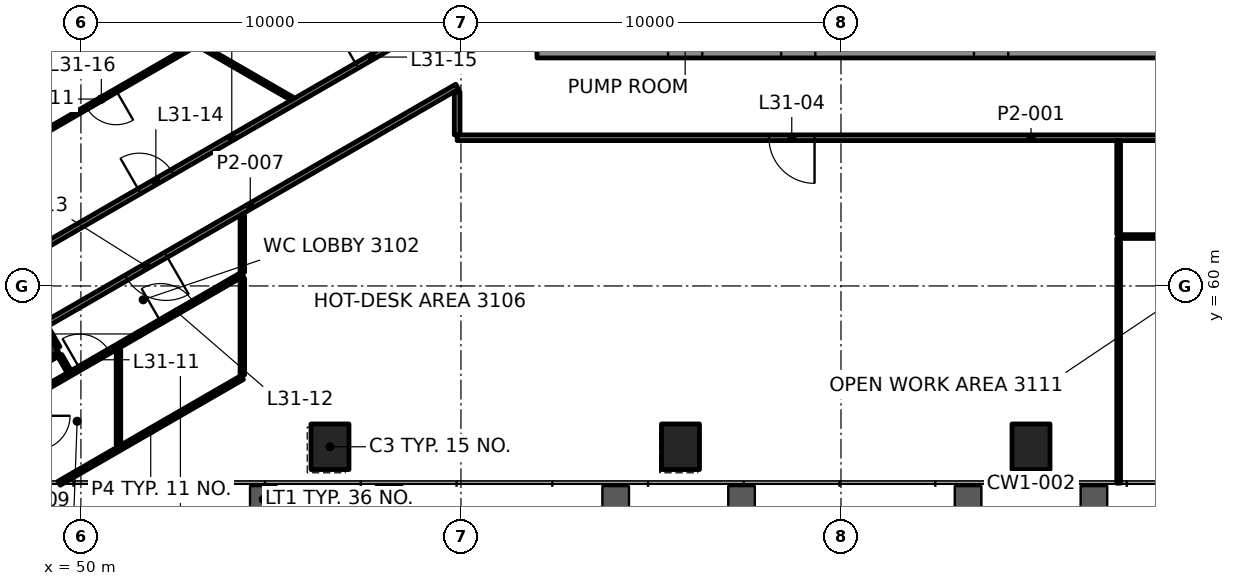
"""IFC4 building model, lengths in metres.
Left out: names, types, materials, properties, quantities, classifications, styles, units other than length and angle.
Written with IfcOpenShell. Run it as: python <this file> out.ifc"""

import sys

from ifc_helpers import new_model, si_unit, direction, frame, frame_2d, origin, origin_2d, place, context, subcontext, project, spatial, rectangle, extrude, element, fill, save


model = new_model("IFC4")
c1 = context("Model", 3, precision=1e-05, world=origin(), true_north=direction((0.0, 1.0)))
c2 = subcontext(c1, "Body", "Model", "MODEL_VIEW")
j1 = project(units=[si_unit("LENGTHUNIT", "METRE"), si_unit("PLANEANGLEUNIT", "RADIAN")], contexts=[c1])
p1 = place(None, origin())
s1 = spatial("IfcSite", under=j1, at=p1, CompositionType="ELEMENT")
p2 = place(p1, origin())
s2 = spatial("IfcBuilding", under=s1, at=p2, CompositionType="ELEMENT")
p3 = place(p2, frame((0.0, 0.0, 136.6)))
s3 = spatial("IfcBuildingStorey", under=s2, at=p3, CompositionType="ELEMENT", Elevation=136.6)
p4 = place(p3, frame((47.089, 58.886, 0.0), z_axis=(0.0, 0.0, 1.0), x_axis=(0.5, -0.866025403784, 0.0)))
e1 = element("IfcColumn", 1, at=p4, inside=s3, PredefinedType="COLUMN", context=c2, shape_type="SweptSolid", body=[
    extrude(rectangle(XDim=3.4, YDim=3.4, at=origin_2d()), origin(), (0.0, 0.0, 1.0), 4.2),
])
for number, where, z_axis, x_axis in (
    (2, (56.554, 55.768, -0.0), (0.0, 0.0, 1.0), (1.0, 0.0, 0.0)),
    (3, (65.777, 55.768, -0.0), (0.0, 0.0, 1.0), (1.0, 0.0, 0.0)),
    (4, (75.0, 55.768, -0.0), (0.0, 0.0, 1.0), (1.0, 0.0, 0.0)),
):
    element("IfcColumn", number, at=place(p3, frame(where, z_axis=z_axis, x_axis=x_axis)), inside=s3, PredefinedType="COLUMN", context=c2, shape_type="SweptSolid", body=[
        extrude(rectangle(XDim=1.0, YDim=1.2, at=origin_2d()), origin(), (0.0, 0.0, 1.0), 4.2),
    ])
p5 = place(p3, frame((62.0, 66.45, 0.0), z_axis=(0.0, 0.0, 1.0), x_axis=(1.0, 0.0, 0.0)))
e5 = element("IfcWall", 5, at=p5, inside=s3, PredefinedType="SHEAR", context=c2, shape_type="SweptSolid", body=[
    extrude(rectangle(XDim=26.0, YDim=0.9, at=frame_2d((13.0, 0.0))), origin(), (0.0, 0.0, 1.0), 3.9),
])
p6 = place(p5, frame((3.45, 0.0, 0.0)))
e6 = element("IfcOpeningElement", 6, at=p6, cuts=e5, PredefinedType="OPENING", context=c2, shape_type="SweptSolid", body=[
    extrude(rectangle(XDim=0.9, YDim=2.1, at=frame_2d((0.45, 1.05))), frame((0.0, 0.46, 0.0), z_axis=(0.0, -1.0, 0.0), x_axis=(1.0, 0.0, 0.0)), (0.0, 0.0, 1.0), 0.92),
])
p7 = place(p5, frame((6.425, 0.0, 0.0)))
e7 = element("IfcOpeningElement", 7, at=p7, cuts=e5, PredefinedType="OPENING", context=c2, shape_type="SweptSolid", body=[
    extrude(rectangle(XDim=0.9, YDim=2.1, at=frame_2d((0.45, 1.05))), frame((0.0, 0.46, 0.0), z_axis=(0.0, -1.0, 0.0), x_axis=(1.0, 0.0, 0.0)), (0.0, 0.0, 1.0), 0.92),
])
p8 = place(p5, frame((11.5, 0.0, 0.0)))
e8 = element("IfcOpeningElement", 8, at=p8, cuts=e5, PredefinedType="OPENING", context=c2, shape_type="SweptSolid", body=[
    extrude(rectangle(XDim=0.9, YDim=2.1, at=frame_2d((0.45, 1.05))), frame((0.0, 0.46, 0.0), z_axis=(0.0, -1.0, 0.0), x_axis=(1.0, 0.0, 0.0)), (0.0, 0.0, 1.0), 0.92),
])
p9 = place(p5, frame((18.5, 0.0, 0.0)))
e9 = element("IfcOpeningElement", 9, at=p9, cuts=e5, PredefinedType="OPENING", context=c2, shape_type="SweptSolid", body=[
    extrude(rectangle(XDim=0.9, YDim=2.1, at=frame_2d((0.45, 1.05))), frame((0.0, 0.46, 0.0), z_axis=(0.0, -1.0, 0.0), x_axis=(1.0, 0.0, 0.0)), (0.0, 0.0, 1.0), 0.92),
])
p10 = place(p5, frame((23.325, 0.0, 0.0)))
e10 = element("IfcOpeningElement", 10, at=p10, cuts=e5, PredefinedType="OPENING", context=c2, shape_type="SweptSolid", body=[
    extrude(rectangle(XDim=0.9, YDim=2.1, at=frame_2d((0.45, 1.05))), frame((0.0, 0.46, 0.0), z_axis=(0.0, -1.0, 0.0), x_axis=(1.0, 0.0, 0.0)), (0.0, 0.0, 1.0), 0.92),
])
p11 = place(p3, frame((77.306, 61.3, 0.0), z_axis=(0.0, 0.0, 1.0), x_axis=(1.0, 0.0, 0.0)))
e11 = element("IfcWall", 11, at=p11, inside=s3, PredefinedType="PARTITIONING", context=c2, shape_type="SweptSolid", body=[
    extrude(rectangle(XDim=14.423, YDim=0.1, at=frame_2d((7.211, 0.0))), origin(), (0.0, 0.0, 1.0), 3.3),
])
p12 = place(p11, frame((3.687, 0.0, 0.0)))
e12 = element("IfcOpeningElement", 12, at=p12, cuts=e11, PredefinedType="OPENING", context=c2, shape_type="SweptSolid", body=[
    extrude(rectangle(XDim=0.9, YDim=2.1, at=frame_2d((0.45, 1.05))), frame((0.0, 0.06, 0.0), z_axis=(0.0, -1.0, 0.0), x_axis=(1.0, 0.0, 0.0)), (0.0, 0.0, 1.0), 0.12),
])
p13 = place(p11, frame((10.695, 0.0, 0.0)))
e13 = element("IfcOpeningElement", 13, at=p13, cuts=e11, PredefinedType="OPENING", context=c2, shape_type="SweptSolid", body=[
    extrude(rectangle(XDim=0.9, YDim=2.1, at=frame_2d((0.45, 1.05))), frame((0.0, 0.06, 0.0), z_axis=(0.0, -1.0, 0.0), x_axis=(1.0, 0.0, 0.0)), (0.0, 0.0, 1.0), 0.12),
])
p14 = place(p3, frame((90.1, 63.9, 0.0), z_axis=(0.0, 0.0, 1.0), x_axis=(-1.0, 0.0, 0.0)))
e14 = element("IfcWall", 14, at=p14, inside=s3, PredefinedType="PARTITIONING", context=c2, shape_type="SweptSolid", body=[
    extrude(rectangle(XDim=30.199, YDim=0.15, at=frame_2d((15.1, 0.0))), origin(), (0.0, 0.0, 1.0), 3.3),
])
p15 = place(p14, frame((5.999, 0.0, 0.0)))
e15 = element("IfcOpeningElement", 15, at=p15, cuts=e14, PredefinedType="OPENING", context=c2, shape_type="SweptSolid", body=[
    extrude(rectangle(XDim=1.0, YDim=2.1, at=frame_2d((0.5, 1.05))), frame((0.0, 0.085, 0.0), z_axis=(0.0, -1.0, 0.0), x_axis=(1.0, 0.0, 0.0)), (0.0, 0.0, 1.0), 0.17),
])
p16 = place(p14, frame((20.795, 0.0, 0.0)))
e16 = element("IfcOpeningElement", 16, at=p16, cuts=e14, PredefinedType="OPENING", context=c2, shape_type="SweptSolid", body=[
    extrude(rectangle(XDim=1.2, YDim=2.1, at=frame_2d((0.6, 1.05))), frame((0.0, 0.085, 0.0), z_axis=(0.0, -1.0, 0.0), x_axis=(1.0, 0.0, 0.0)), (0.0, 0.0, 1.0), 0.17),
])
p17 = place(p3, frame((49.427, 54.808, 0.0), z_axis=(0.0, 0.0, 1.0), x_axis=(0.866021245731, 0.500007201891, 0.0)))
e17 = element("IfcWall", 17, at=p17, inside=s3, PredefinedType="PARTITIONING", context=c2, shape_type="SweptSolid", body=[
    extrude(rectangle(XDim=5.566, YDim=0.12, at=frame_2d((2.783, 0.0))), origin(), (0.0, 0.0, 1.0), 3.3),
])
p18 = place(p3, frame((48.814, 57.168, 0.0), z_axis=(0.0, 0.0, 1.0), x_axis=(0.866009986161, 0.500026703156, 0.0)))
e18 = element("IfcWall", 18, at=p18, inside=s3, PredefinedType="PARTITIONING", context=c2, shape_type="SweptSolid", body=[
    extrude(rectangle(XDim=6.275, YDim=0.12, at=frame_2d((3.137, 0.0))), origin(), (0.0, 0.0, 1.0), 3.3),
])
p19 = place(p18, frame((1.329, 0.0, 0.0)))
e19 = element("IfcOpeningElement", 19, at=p19, cuts=e18, PredefinedType="OPENING", context=c2, shape_type="SweptSolid", body=[
    extrude(rectangle(XDim=0.9, YDim=2.1, at=frame_2d((0.45, 1.05))), frame((0.0, 0.07, 0.0), z_axis=(0.0, -1.0, 0.0), x_axis=(1.0, 0.0, 0.0)), (0.0, 0.0, 1.0), 0.14),
])
p20 = place(p18, frame((3.791, 0.0, 0.0)))
e20 = element("IfcOpeningElement", 20, at=p20, cuts=e18, PredefinedType="OPENING", context=c2, shape_type="SweptSolid", body=[
    extrude(rectangle(XDim=1.0, YDim=2.1, at=frame_2d((0.5, 1.05))), frame((0.0, 0.07, 0.0), z_axis=(0.0, -1.0, 0.0), x_axis=(1.0, 0.0, 0.0)), (0.0, 0.0, 1.0), 0.14),
])
p21 = place(p3, frame((46.329, 56.484, 0.0), z_axis=(0.0, 0.0, 1.0), x_axis=(0.866034141321, 0.499984865837, 0.0)))
e21 = element("IfcWall", 21, at=p21, inside=s3, PredefinedType="PARTITIONING", context=c2, shape_type="SweptSolid", body=[
    extrude(rectangle(XDim=3.543, YDim=0.2, at=frame_2d((1.772, 0.0))), origin(), (0.0, 0.0, 1.0), 3.3),
])
p22 = place(p3, frame((59.9, 65.243, 0.0), z_axis=(0.0, 0.0, 1.0), x_axis=(-0.866021305353, -0.500007098624, 0.0)))
e22 = element("IfcWall", 22, at=p22, inside=s3, PredefinedType="PARTITIONING", context=c2, shape_type="SweptSolid", body=[
    extrude(rectangle(XDim=12.572, YDim=0.15, at=frame_2d((6.286, 0.0))), origin(), (0.0, 0.0, 1.0), 3.147),
])
p23 = place(p22, frame((8.848, 0.0, 0.0)))
e23 = element("IfcOpeningElement", 23, at=p23, cuts=e22, PredefinedType="OPENING", context=c2, shape_type="SweptSolid", body=[
    extrude(rectangle(XDim=1.2, YDim=2.1, at=frame_2d((0.6, 1.05))), frame((0.0, 0.085, 0.0), z_axis=(0.0, -1.0, 0.0), x_axis=(1.0, 0.0, 0.0)), (0.0, 0.0, 1.0), 0.17),
])
p24 = place(p3, frame((48.114, 60.517, 0.0), z_axis=(0.0, 0.0, 1.0), x_axis=(0.866023530324, 0.500003244914, 0.0)))
e24 = element("IfcWall", 24, at=p24, inside=s3, PredefinedType="PARTITIONING", context=c2, shape_type="SweptSolid", body=[
    extrude(rectangle(XDim=13.522, YDim=0.15, at=frame_2d((6.761, 0.0))), origin(), (0.0, 0.0, 1.0), 3.3),
])
p25 = place(p24, frame((3.954, 0.0, 0.0)))
e25 = element("IfcOpeningElement", 25, at=p25, cuts=e24, PredefinedType="OPENING", context=c2, shape_type="SweptSolid", body=[
    extrude(rectangle(XDim=1.0, YDim=2.1, at=frame_2d((0.5, 1.05))), frame((0.0, 0.085, 0.0), z_axis=(0.0, -1.0, 0.0), x_axis=(1.0, 0.0, 0.0)), (0.0, 0.0, 1.0), 0.17),
])
p26 = place(p24, frame((10.562, 0.0, 0.0)))
e26 = element("IfcOpeningElement", 26, at=p26, cuts=e24, PredefinedType="OPENING", context=c2, shape_type="SweptSolid", body=[
    extrude(rectangle(XDim=0.9, YDim=2.1, at=frame_2d((0.45, 1.05))), frame((0.0, 0.085, 0.0), z_axis=(0.0, -1.0, 0.0), x_axis=(1.0, 0.0, 0.0)), (0.0, 0.0, 1.0), 0.17),
])
p27 = place(p3, frame((52.978, 66.327, 0.0), z_axis=(0.0, 0.0, 1.0), x_axis=(-0.86603265506, -0.499987440211, 0.0)))
e27 = element("IfcWall", 27, at=p27, inside=s3, PredefinedType="PARTITIONING", context=c2, shape_type="SweptSolid", body=[
    extrude(rectangle(XDim=5.636, YDim=0.1, at=frame_2d((2.818, 0.0))), origin(), (0.0, 0.0, 1.0), 3.3),
])
p28 = place(p27, frame((2.368, 0.0, 0.0)))
e28 = element("IfcOpeningElement", 28, at=p28, cuts=e27, PredefinedType="OPENING", context=c2, shape_type="SweptSolid", body=[
    extrude(rectangle(XDim=0.9, YDim=2.1, at=frame_2d((0.45, 1.05))), frame((0.0, 0.06, 0.0), z_axis=(0.0, -1.0, 0.0), x_axis=(1.0, 0.0, 0.0)), (0.0, 0.0, 1.0), 0.12),
])
p29 = place(p3, frame((77.306, 54.808, 0.0), z_axis=(0.0, 0.0, 1.0), x_axis=(0.0, 1.0, 0.0)))
e29 = element("IfcWall", 29, at=p29, inside=s3, PredefinedType="PARTITIONING", context=c2, shape_type="SweptSolid", body=[
    extrude(rectangle(XDim=6.442, YDim=0.1, at=frame_2d((3.221, 0.0))), origin(), (0.0, 0.0, 1.0), 3.065),
])
p30 = place(p3, frame((59.9, 63.976, 0.0), z_axis=(0.0, 0.0, 1.0), x_axis=(0.0, 1.0, 0.0)))
e30 = element("IfcWall", 30, at=p30, inside=s3, PredefinedType="PARTITIONING", context=c2, shape_type="SweptSolid", body=[
    extrude(rectangle(XDim=1.131, YDim=0.15, at=frame_2d((0.565, 0.0))), origin(), (0.0, 0.0, 1.0), 3.147),
])
p31 = place(p3, frame((54.248, 57.661, 0.0), z_axis=(0.0, 0.0, 1.0), x_axis=(0.0, 1.0, 0.0)))
e31 = element("IfcWall", 31, at=p31, inside=s3, PredefinedType="PARTITIONING", context=c2, shape_type="SweptSolid", body=[
    extrude(rectangle(XDim=2.54, YDim=0.12, at=frame_2d((1.27, 0.0))), origin(), (0.0, 0.0, 1.0), 3.3),
])
p32 = place(p3, frame((50.988, 55.819, 0.0), z_axis=(0.0, 0.0, 1.0), x_axis=(0.0, 1.0, 0.0)))
e32 = element("IfcWall", 32, at=p32, inside=s3, PredefinedType="PARTITIONING", context=c2, shape_type="SweptSolid", body=[
    extrude(rectangle(XDim=2.495, YDim=0.12, at=frame_2d((1.248, 0.0))), origin(), (0.0, 0.0, 1.0), 3.3),
])
p33 = place(p3, frame((49.362, 58.351, 0.0), z_axis=(0.0, 0.0, 1.0), x_axis=(-0.499880341542, 0.866094477606, 0.0)))
e33 = element("IfcWall", 33, at=p33, inside=s3, PredefinedType="PARTITIONING", context=c2, shape_type="SweptSolid", body=[
    extrude(rectangle(XDim=0.625, YDim=0.2, at=frame_2d((0.312, 0.0))), origin(), (0.0, 0.0, 1.0), 3.3),
])
p34 = place(p3, frame((49.685, 57.751, 0.0), z_axis=(0.0, 0.0, 1.0), x_axis=(-0.499913221443, 0.866075499611, 0.0)))
e34 = element("IfcWall", 34, at=p34, inside=s3, PredefinedType="PARTITIONING", context=c2, shape_type="SweptSolid", body=[
    extrude(rectangle(XDim=0.48, YDim=0.12, at=frame_2d((0.24, 0.0))), origin(), (0.0, 0.0, 1.0), 3.3),
])
p35 = place(p3, frame((55.553, 64.928, 0.0), z_axis=(0.0, 0.0, 1.0), x_axis=(-0.866024775297, 0.500001088571, 0.0)))
e35 = element("IfcWall", 35, at=p35, inside=s3, PredefinedType="PARTITIONING", context=c2, shape_type="SweptSolid", body=[
    extrude(rectangle(XDim=6.826, YDim=0.1, at=frame_2d((3.413, 0.0))), origin(), (0.0, 0.0, 1.0), 3.3),
])
p36 = place(p3, frame((77.306, 61.35, 0.0), z_axis=(0.0, 0.0, 1.0), x_axis=(0.0, 1.0, 0.0)))
e36 = element("IfcWall", 36, at=p36, inside=s3, PredefinedType="PARTITIONING", context=c2, shape_type="SweptSolid", body=[
    extrude(rectangle(XDim=2.475, YDim=0.1, at=frame_2d((1.237, 0.0))), origin(), (0.0, 0.0, 1.0), 3.3),
])
p37 = place(p3, frame((54.248, 60.357, 0.0), z_axis=(0.0, 0.0, 1.0), x_axis=(0.0, 1.0, 0.0)))
e37 = element("IfcWall", 37, at=p37, inside=s3, PredefinedType="PARTITIONING", context=c2, shape_type="SweptSolid", body=[
    extrude(rectangle(XDim=1.496, YDim=0.12, at=frame_2d((0.748, 0.0))), origin(), (0.0, 0.0, 1.0), 3.3),
])
p38 = place(p16, origin())
e38 = element("IfcDoor", 38, at=p38, inside=s3, OperationType="DOUBLE_DOOR_SINGLE_SWING", PredefinedType="DOOR", context=c2, shape_type="SweptSolid", body=[
    extrude(rectangle(XDim=1.2, YDim=2.1, at=frame_2d((0.6, 1.05))), frame((0.0, 0.025, 0.0), z_axis=(0.0, -1.0, 0.0), x_axis=(1.0, 0.0, 0.0)), (0.0, 0.0, 1.0), 0.05),
])
fill(e16, e38)
p39 = place(p19, origin())
e39 = element("IfcDoor", 39, at=p39, inside=s3, OperationType="SINGLE_SWING_LEFT", PredefinedType="DOOR", context=c2, shape_type="SweptSolid", body=[
    extrude(rectangle(XDim=0.9, YDim=2.1, at=frame_2d((0.45, 1.05))), frame((0.0, 0.025, 0.0), z_axis=(0.0, -1.0, 0.0), x_axis=(1.0, 0.0, 0.0)), (0.0, 0.0, 1.0), 0.05),
])
fill(e19, e39)
p40 = place(p20, origin())
e40 = element("IfcDoor", 40, at=p40, inside=s3, OperationType="SINGLE_SWING_RIGHT", PredefinedType="DOOR", context=c2, shape_type="SweptSolid", body=[
    extrude(rectangle(XDim=1.0, YDim=2.1, at=frame_2d((0.5, 1.05))), frame((0.0, 0.025, 0.0), z_axis=(0.0, -1.0, 0.0), x_axis=(1.0, 0.0, 0.0)), (0.0, 0.0, 1.0), 0.05),
])
fill(e20, e40)
p41 = place(p23, origin())
e41 = element("IfcDoor", 41, at=p41, inside=s3, OperationType="DOUBLE_DOOR_SINGLE_SWING", PredefinedType="DOOR", context=c2, shape_type="SweptSolid", body=[
    extrude(rectangle(XDim=1.2, YDim=2.1, at=frame_2d((0.6, 1.05))), frame((0.0, 0.025, 0.0), z_axis=(0.0, -1.0, 0.0), x_axis=(1.0, 0.0, 0.0)), (0.0, 0.0, 1.0), 0.05),
])
fill(e23, e41)
p42 = place(p25, origin())
e42 = element("IfcDoor", 42, at=p42, inside=s3, OperationType="SINGLE_SWING_RIGHT", PredefinedType="DOOR", context=c2, shape_type="SweptSolid", body=[
    extrude(rectangle(XDim=1.0, YDim=2.1, at=frame_2d((0.5, 1.05))), frame((0.0, 0.025, 0.0), z_axis=(0.0, -1.0, 0.0), x_axis=(1.0, 0.0, 0.0)), (0.0, 0.0, 1.0), 0.05),
])
fill(e25, e42)
p43 = place(p26, origin())
e43 = element("IfcDoor", 43, at=p43, inside=s3, OperationType="SINGLE_SWING_LEFT", PredefinedType="DOOR", context=c2, shape_type="SweptSolid", body=[
    extrude(rectangle(XDim=0.9, YDim=2.1, at=frame_2d((0.45, 1.05))), frame((0.0, 0.025, 0.0), z_axis=(0.0, -1.0, 0.0), x_axis=(1.0, 0.0, 0.0)), (0.0, 0.0, 1.0), 0.05),
])
fill(e26, e43)
p44 = place(p28, origin())
e44 = element("IfcDoor", 44, at=p44, inside=s3, OperationType="SINGLE_SWING_RIGHT", PredefinedType="DOOR", context=c2, shape_type="SweptSolid", body=[
    extrude(rectangle(XDim=0.9, YDim=2.1, at=frame_2d((0.45, 1.05))), frame((0.0, 0.025, 0.0), z_axis=(0.0, -1.0, 0.0), x_axis=(1.0, 0.0, 0.0)), (0.0, 0.0, 1.0), 0.05),
])
fill(e28, e44)
save(model, sys.argv[1])
